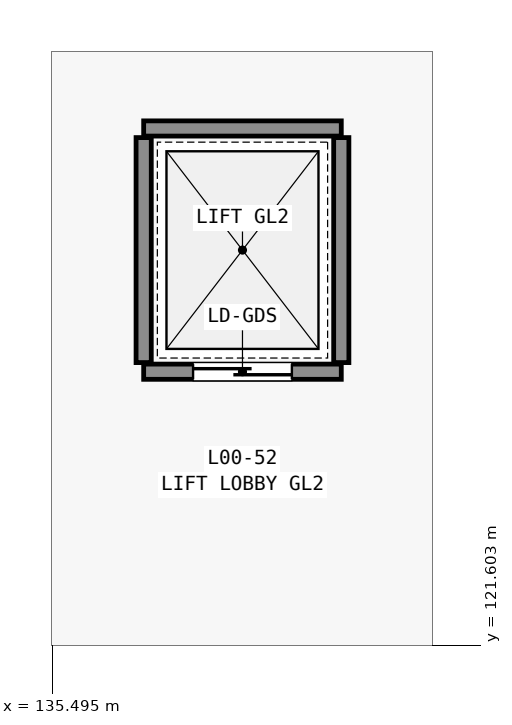
"""IFC4 building model, lengths in metres.
Left out: names, types, materials, properties, quantities, classifications, styles, units other than length and angle.
Written with IfcOpenShell. Run it as: python <this file> out.ifc"""

import sys

from ifc_helpers import new_model, si_unit, direction, frame, frame_2d, origin, place, context, subcontext, project, spatial, rectangle, extrude, element, fill, save


model = new_model("IFC4")
c1 = context("Model", 3, precision=1e-05, world=origin(), true_north=direction((0.0, 1.0)))
c2 = subcontext(c1, "Body", "Model", "MODEL_VIEW")
j1 = project(units=[si_unit("LENGTHUNIT", "METRE"), si_unit("PLANEANGLEUNIT", "RADIAN")], contexts=[c1])
p1 = place(None, origin())
s1 = spatial("IfcSite", under=j1, at=p1, CompositionType="ELEMENT")
p2 = place(p1, origin())
s2 = spatial("IfcBuilding", under=s1, at=p2, CompositionType="ELEMENT")
p3 = place(p2, origin())
s3 = spatial("IfcBuildingStorey", under=s2, at=p3, CompositionType="ELEMENT", Elevation=0.0)
p4 = place(p3, frame((136.7, 125.2, 0.0), z_axis=(0.0, 0.0, 1.0), x_axis=(1.0, 0.0, 0.0)))
e1 = element("IfcWall", 1, at=p4, inside=s3, PredefinedType="STANDARD", context=c2, shape_type="SweptSolid", body=[
    extrude(rectangle(XDim=2.6, YDim=0.2, at=frame_2d((1.3, 0.0))), origin(), (0.0, 0.0, 1.0), 5.64),
])
p5 = place(p4, frame((0.65, 0.0, 0.0)))
e2 = element("IfcOpeningElement", 2, at=p5, cuts=e1, PredefinedType="OPENING", context=c2, shape_type="SweptSolid", body=[
    extrude(rectangle(XDim=1.3, YDim=2.15, at=frame_2d((0.65, 1.075))), frame((0.0, 0.11, 0.0), z_axis=(0.0, -1.0, 0.0), x_axis=(1.0, 0.0, 0.0)), (0.0, 0.0, 1.0), 0.22),
])
p6 = place(p3, frame((136.7, 128.4, 0.0), z_axis=(0.0, 0.0, 1.0), x_axis=(1.0, 0.0, 0.0)))
e3 = element("IfcWall", 3, at=p6, inside=s3, PredefinedType="STANDARD", context=c2, shape_type="SweptSolid", body=[
    extrude(rectangle(XDim=2.6, YDim=0.2, at=frame_2d((1.3, 0.0))), origin(), (0.0, 0.0, 1.0), 5.64),
])
for number, where, z_axis, x_axis in (
    (4, (136.7, 125.32, 0.0), (0.0, 0.0, 1.0), (0.0, 1.0, 0.0)),
    (5, (139.3, 125.32, 0.0), (0.0, 0.0, 1.0), (0.0, 1.0, 0.0)),
):
    element("IfcWall", number, at=place(p3, frame(where, z_axis=z_axis, x_axis=x_axis)), inside=s3, PredefinedType="STANDARD", context=c2, shape_type="SweptSolid", body=[
        extrude(rectangle(XDim=2.96, YDim=0.2, at=frame_2d((1.48, 0.0))), origin(), (0.0, 0.0, 1.0), 5.64),
    ])
p7 = place(p5, origin())
e6 = element("IfcDoor", 6, at=p7, inside=s3, OperationType="SLIDING_TO_LEFT", PredefinedType="DOOR", context=c2, shape_type="SweptSolid", body=[
    extrude(rectangle(XDim=1.3, YDim=2.15, at=frame_2d((0.65, 1.075))), frame((0.0, 0.025, 0.0), z_axis=(0.0, -1.0, 0.0), x_axis=(1.0, 0.0, 0.0)), (0.0, 0.0, 1.0), 0.05),
])
fill(e2, e6)
save(model, sys.argv[1])
